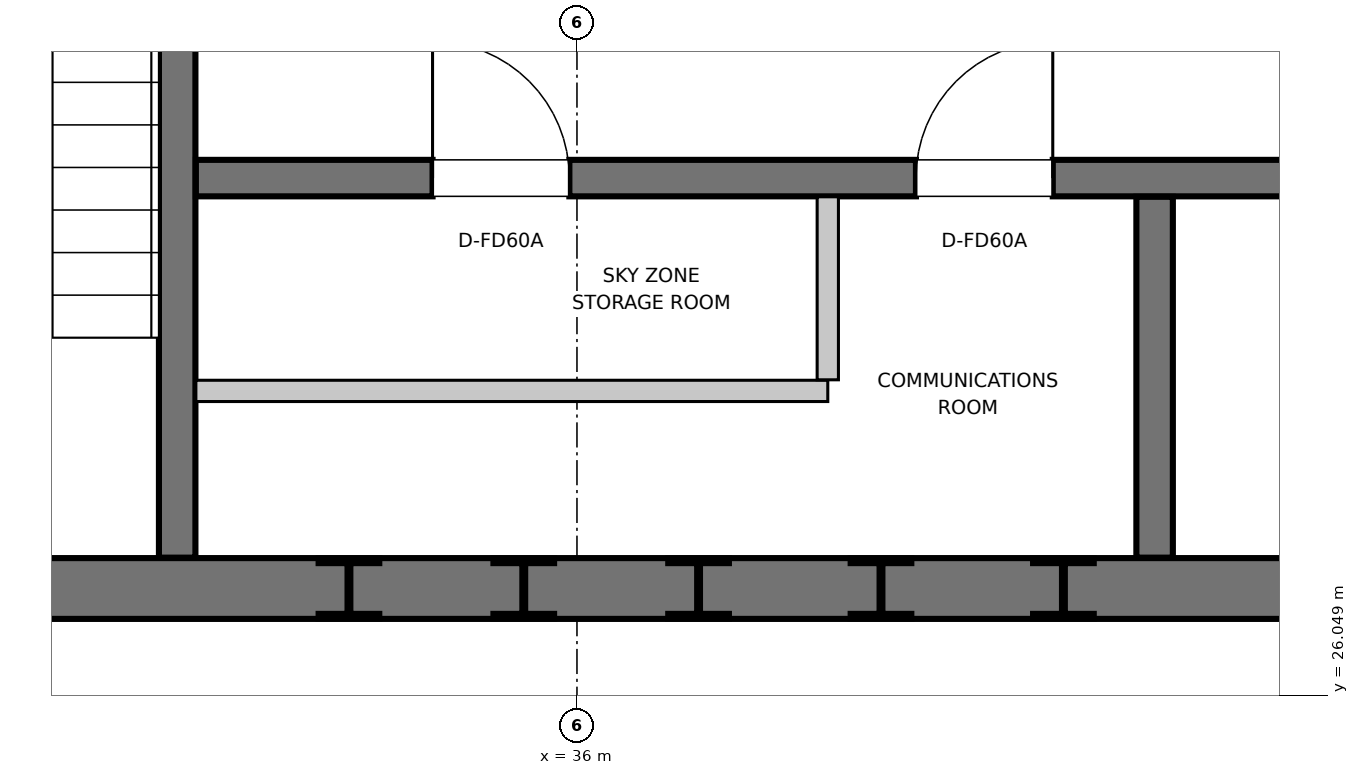
"""IFC4 building model, lengths in metres.
Left out: names, types, materials, properties, quantities, classifications, styles, units other than length and angle.
Written with IfcOpenShell. Run it as: python <this file> out.ifc"""

import sys

from ifc_helpers import new_model, si_unit, direction, frame, frame_2d, origin, origin_2d, place, context, subcontext, project, spatial, rectangle, i_section, extrude, element, fill, save


model = new_model("IFC4")
c1 = context("Model", 3, precision=1e-05, world=origin(), true_north=direction((0.0, 1.0)))
c2 = subcontext(c1, "Body", "Model", "MODEL_VIEW")
j1 = project(units=[si_unit("LENGTHUNIT", "METRE"), si_unit("PLANEANGLEUNIT", "RADIAN")], contexts=[c1])
p1 = place(None, origin())
s1 = spatial("IfcSite", under=j1, at=p1, CompositionType="ELEMENT")
p2 = place(p1, origin())
s2 = spatial("IfcBuilding", under=s1, at=p2, CompositionType="ELEMENT")
p3 = place(p2, frame((0.0, 0.0, 291.5)))
s3 = spatial("IfcBuildingStorey", under=s2, at=p3, CompositionType="ELEMENT", Elevation=291.5)
for number, where, z_axis, x_axis in (
    (1, (34.5, 26.75, 0.0), (0.0, 0.0, 1.0), (1.0, 0.0, 0.0)),
    (2, (36.8, 26.75, 0.0), (0.0, 0.0, 1.0), (1.0, 0.0, 0.0)),
    (3, (39.2, 26.75, 0.0), (0.0, 0.0, 1.0), (1.0, 0.0, 0.0)),
    (4, (35.65, 26.75, 0.0), (0.0, 0.0, 1.0), (1.0, 0.0, 0.0)),
    (5, (38.0, 26.75, 0.0), (0.0, 0.0, 1.0), (1.0, 0.0, 0.0)),
):
    element("IfcColumn", number, at=place(p3, frame(where, z_axis=z_axis, x_axis=x_axis)), inside=s3, PredefinedType="COLUMN", context=c2, shape_type="SweptSolid", body=[
        extrude(i_section(OverallWidth=0.399, OverallDepth=0.393, WebThickness=0.019, FlangeThickness=0.03, at=origin_2d()), origin(), (0.0, 0.0, 1.0), 4.5),
    ])
p4 = place(p3, frame((21.65, 26.75, 0.0), z_axis=(0.0, 0.0, 1.0), x_axis=(1.0, 0.0, 0.0)))
e6 = element("IfcWall", 6, at=p4, inside=s3, PredefinedType="SHEAR", context=c2, shape_type="SweptSolid", body=[
    extrude(rectangle(XDim=28.7, YDim=0.4, at=frame_2d((14.35, 0.0))), origin(), (0.0, 0.0, 1.0), 4.5),
])
p5 = place(p4, frame((1.375, 0.0, 0.0)))
e7 = element("IfcOpeningElement", 7, at=p5, cuts=e6, PredefinedType="OPENING", context=c2, shape_type="SweptSolid", body=[
    extrude(rectangle(XDim=1.05, YDim=2.0, at=frame_2d((0.525, 1.0))), frame((0.0, 0.21, 0.0), z_axis=(0.0, -1.0, 0.0), x_axis=(1.0, 0.0, 0.0)), (0.0, 0.0, 1.0), 0.42),
])
p6 = place(p4, frame((5.375, 0.0, 0.0)))
e8 = element("IfcOpeningElement", 8, at=p6, cuts=e6, PredefinedType="OPENING", context=c2, shape_type="SweptSolid", body=[
    extrude(rectangle(XDim=1.05, YDim=2.0, at=frame_2d((0.525, 1.0))), frame((0.0, 0.21, 0.0), z_axis=(0.0, -1.0, 0.0), x_axis=(1.0, 0.0, 0.0)), (0.0, 0.0, 1.0), 0.42),
])
p7 = place(p4, frame((9.575, 0.0, 0.0)))
e9 = element("IfcOpeningElement", 9, at=p7, cuts=e6, PredefinedType="OPENING", context=c2, shape_type="SweptSolid", body=[
    extrude(rectangle(XDim=1.05, YDim=2.0, at=frame_2d((0.525, 1.0))), frame((0.0, 0.21, 0.0), z_axis=(0.0, -1.0, 0.0), x_axis=(1.0, 0.0, 0.0)), (0.0, 0.0, 1.0), 0.42),
])
p8 = place(p4, frame((19.705, 0.0, 0.0)))
e10 = element("IfcOpeningElement", 10, at=p8, cuts=e6, PredefinedType="OPENING", context=c2, shape_type="SweptSolid", body=[
    extrude(rectangle(XDim=1.45, YDim=2.0, at=frame_2d((0.725, 1.0))), frame((0.0, 0.21, 0.0), z_axis=(0.0, -1.0, 0.0), x_axis=(1.0, 0.0, 0.0)), (0.0, 0.0, 1.0), 0.42),
])
p9 = place(p4, frame((26.275, 0.0, 0.0)))
e11 = element("IfcOpeningElement", 11, at=p9, cuts=e6, PredefinedType="OPENING", context=c2, shape_type="SweptSolid", body=[
    extrude(rectangle(XDim=1.05, YDim=2.0, at=frame_2d((0.525, 1.0))), frame((0.0, 0.21, 0.0), z_axis=(0.0, -1.0, 0.0), x_axis=(1.0, 0.0, 0.0)), (0.0, 0.0, 1.0), 0.42),
])
p10 = place(p3, frame((33.37, 26.953, 0.0), z_axis=(0.0, 0.0, 1.0), x_axis=(0.0, 1.0, 0.0)))
e12 = element("IfcWall", 12, at=p10, inside=s3, PredefinedType="SHEAR", context=c2, shape_type="SweptSolid", body=[
    extrude(rectangle(XDim=8.394, YDim=0.24, at=frame_2d((4.197, 0.0))), origin(), (0.0, 0.0, 1.0), 4.5),
])
p11 = place(p3, frame((33.493, 29.45, 0.0), z_axis=(0.0, 0.0, 1.0), x_axis=(1.0, 0.0, 0.0)))
e13 = element("IfcWall", 13, at=p11, inside=s3, PredefinedType="SHEAR", context=c2, shape_type="SweptSolid", body=[
    extrude(rectangle(XDim=7.507, YDim=0.24, at=frame_2d((3.753, 0.0))), origin(), (0.0, 0.0, 1.0), 4.5),
])
p12 = place(p11, frame((1.557, 0.0, 0.0)))
e14 = element("IfcOpeningElement", 14, at=p12, cuts=e13, PredefinedType="OPENING", context=c2, shape_type="SweptSolid", body=[
    extrude(rectangle(XDim=0.9, YDim=2.0, at=frame_2d((0.45, 1.0))), frame((0.0, 0.13, 0.0), z_axis=(0.0, -1.0, 0.0), x_axis=(1.0, 0.0, 0.0)), (0.0, 0.0, 1.0), 0.26),
])
p13 = place(p11, frame((4.737, 0.0, 0.0)))
e15 = element("IfcOpeningElement", 15, at=p13, cuts=e13, PredefinedType="OPENING", context=c2, shape_type="SweptSolid", body=[
    extrude(rectangle(XDim=0.9, YDim=2.0, at=frame_2d((0.45, 1.0))), frame((0.0, 0.13, 0.0), z_axis=(0.0, -1.0, 0.0), x_axis=(1.0, 0.0, 0.0)), (0.0, 0.0, 1.0), 0.26),
])
p14 = place(p3, frame((39.8, 26.953, 0.0), z_axis=(0.0, 0.0, 1.0), x_axis=(0.0, 1.0, 0.0)))
e16 = element("IfcWall", 16, at=p14, inside=s3, PredefinedType="SHEAR", context=c2, shape_type="SweptSolid", body=[
    extrude(rectangle(XDim=2.374, YDim=0.24, at=frame_2d((1.187, 0.0))), origin(), (0.0, 0.0, 1.0), 4.5),
])
p15 = place(p3, frame((33.493, 28.05, 0.0), z_axis=(0.0, 0.0, 1.0), x_axis=(1.0, 0.0, 0.0)))
e17 = element("IfcWall", 17, at=p15, inside=s3, PredefinedType="PARTITIONING", context=c2, shape_type="SweptSolid", body=[
    extrude(rectangle(XDim=4.157, YDim=0.14, at=frame_2d((2.079, 0.0))), origin(), (0.0, 0.0, 1.0), 4.205),
])
p16 = place(p3, frame((37.65, 28.123, 0.0), z_axis=(0.0, 0.0, 1.0), x_axis=(0.0, 1.0, 0.0)))
e18 = element("IfcWall", 18, at=p16, inside=s3, PredefinedType="PARTITIONING", context=c2, shape_type="SweptSolid", body=[
    extrude(rectangle(XDim=1.204, YDim=0.14, at=frame_2d((0.602, 0.0))), origin(), (0.0, 0.0, 1.0), 4.205),
])
p17 = place(p12, origin())
e19 = element("IfcDoor", 19, at=p17, inside=s3, OperationType="SINGLE_SWING_LEFT", PredefinedType="DOOR", context=c2, shape_type="SweptSolid", body=[
    extrude(rectangle(XDim=0.9, YDim=2.0, at=frame_2d((0.45, 1.0))), frame((0.0, 0.025, 0.0), z_axis=(0.0, -1.0, 0.0), x_axis=(1.0, 0.0, 0.0)), (0.0, 0.0, 1.0), 0.05),
])
fill(e14, e19)
p18 = place(p13, origin())
e20 = element("IfcDoor", 20, at=p18, inside=s3, OperationType="SINGLE_SWING_RIGHT", PredefinedType="DOOR", context=c2, shape_type="SweptSolid", body=[
    extrude(rectangle(XDim=0.9, YDim=2.0, at=frame_2d((0.45, 1.0))), frame((0.0, 0.025, 0.0), z_axis=(0.0, -1.0, 0.0), x_axis=(1.0, 0.0, 0.0)), (0.0, 0.0, 1.0), 0.05),
])
fill(e15, e20)
save(model, sys.argv[1])
